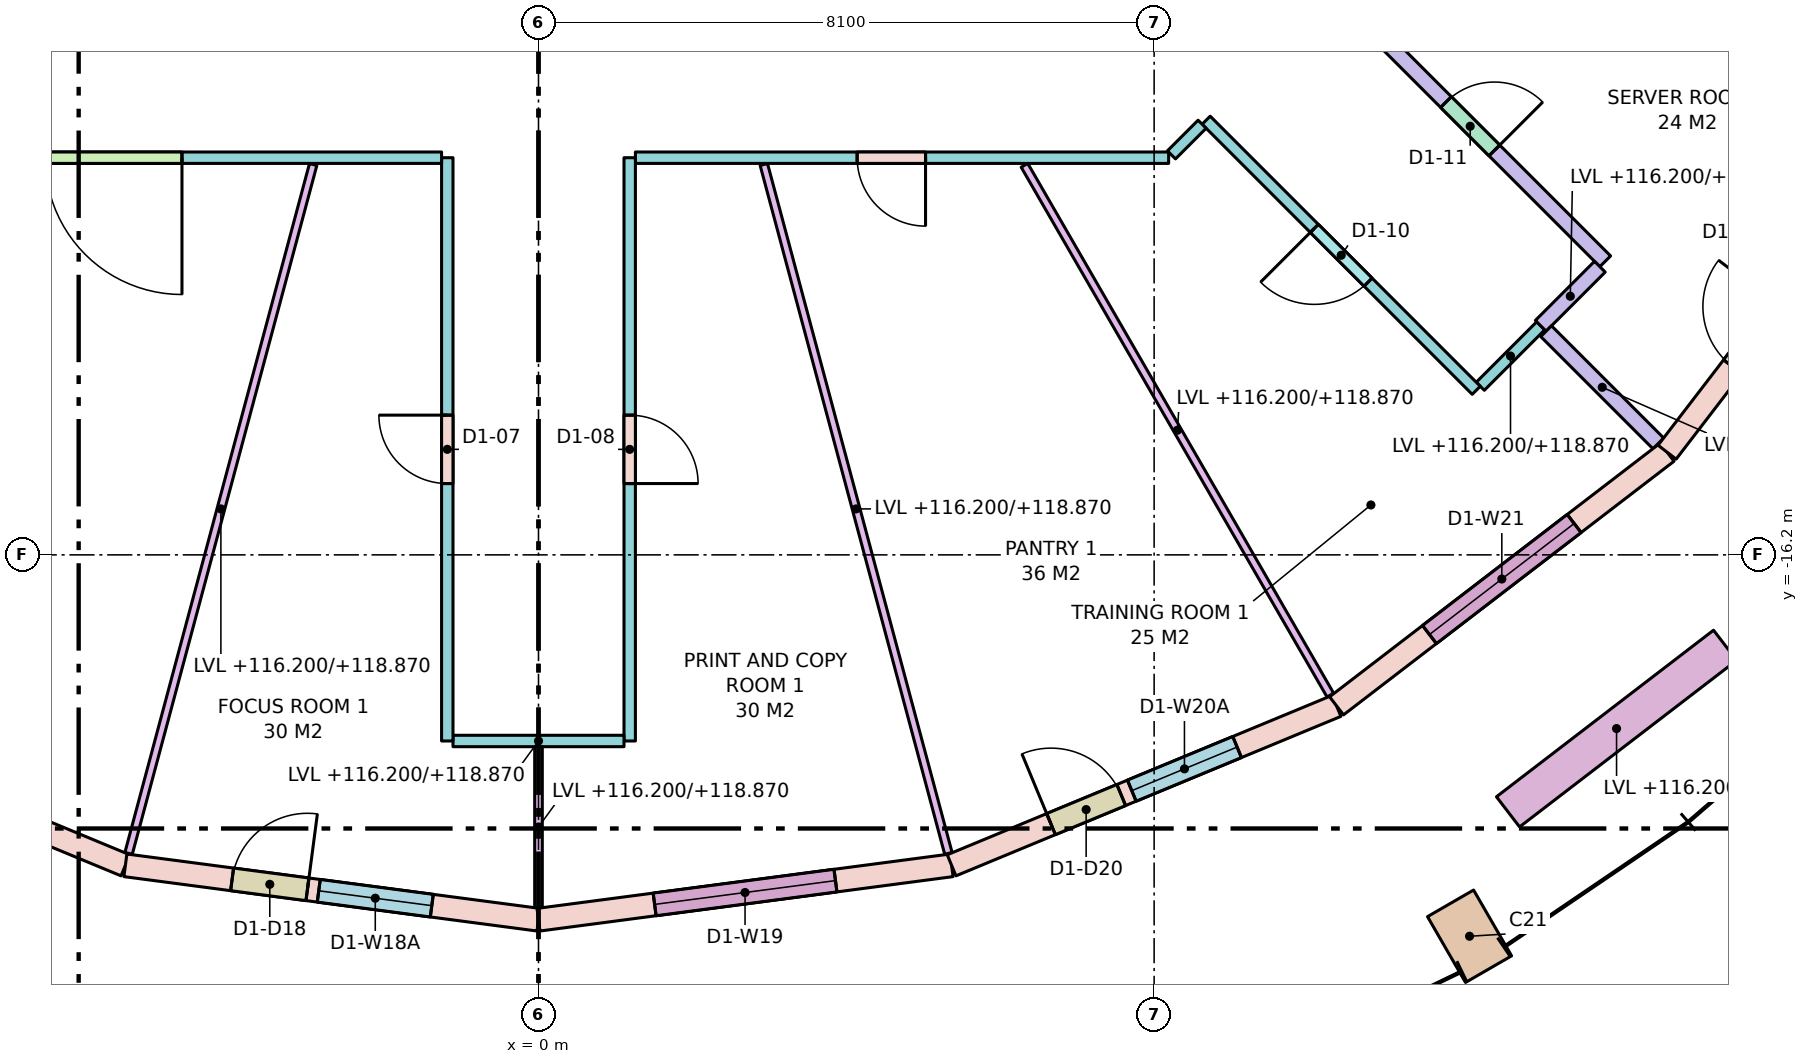
"""IFC4 building model, lengths in metres.
Left out: names, types, materials, properties, quantities, classifications, styles, units other than length and angle.
Written with IfcOpenShell. Run it as: python <this file> out.ifc"""

import sys

from ifc_helpers import new_model, si_unit, direction, frame, frame_2d, origin, origin_2d, place, context, subcontext, project, spatial, rectangle, extrude, element, fill, save


model = new_model("IFC4")
c1 = context("Model", 3, precision=1e-05, world=origin(), true_north=direction((0.0, 1.0)))
c2 = subcontext(c1, "Body", "Model", "MODEL_VIEW")
j1 = project(units=[si_unit("LENGTHUNIT", "METRE"), si_unit("PLANEANGLEUNIT", "RADIAN")], contexts=[c1])
p1 = place(None, origin())
s1 = spatial("IfcSite", under=j1, at=p1, CompositionType="ELEMENT")
p2 = place(p1, origin())
s2 = spatial("IfcBuilding", under=s1, at=p2, CompositionType="ELEMENT")
p3 = place(p2, frame((0.0, 0.0, 116.2)))
s3 = spatial("IfcBuildingStorey", under=s2, at=p3, CompositionType="ELEMENT", Elevation=116.2)
p4 = place(p3, frame((12.25, -21.218, 0.0), z_axis=(0.0, 0.0, 1.0), x_axis=(0.866025403784, 0.5, 0.0)))
e1 = element("IfcColumn", 1, at=p4, inside=s3, PredefinedType="COLUMN", context=c2, shape_type="SweptSolid", body=[
    extrude(rectangle(XDim=0.7, YDim=1.0, at=origin_2d()), origin(), (0.0, 0.0, 1.0), 3.8),
])
p5 = place(p3, frame((-10.5, -18.187, 0.0), z_axis=(0.0, 0.0, 1.0), x_axis=(0.923877333662, -0.382688740813, 0.0)))
e2 = element("IfcWall", 2, at=p5, inside=s3, PredefinedType="STANDARD", context=c2, shape_type="SweptSolid", body=[
    extrude(rectangle(XDim=5.482, YDim=0.3, at=frame_2d((2.741, 0.0))), origin(), (0.0, 0.0, 1.0), 3.52),
])
p6 = place(p5, frame((1.541, 0.0, 0.8)))
e3 = element("IfcOpeningElement", 3, at=p6, cuts=e2, PredefinedType="OPENING", context=c2, shape_type="SweptSolid", body=[
    extrude(rectangle(XDim=2.4, YDim=2.5, at=frame_2d((1.2, 1.25))), frame((0.0, 0.16, 0.0), z_axis=(0.0, -1.0, 0.0), x_axis=(1.0, 0.0, 0.0)), (0.0, 0.0, 1.0), 0.32),
])
p7 = place(p3, frame((-5.435, -20.284, 0.0), z_axis=(0.0, 0.0, 1.0), x_axis=(0.991444743541, -0.130527087244, 0.0)))
e4 = element("IfcWall", 4, at=p7, inside=s3, PredefinedType="STANDARD", context=c2, shape_type="SweptSolid", body=[
    extrude(rectangle(XDim=5.482, YDim=0.3, at=frame_2d((2.741, 0.0))), origin(), (0.0, 0.0, 1.0), 3.52),
])
p8 = place(p7, frame((1.416, 0.0, 0.0)))
e5 = element("IfcOpeningElement", 5, at=p8, cuts=e4, PredefinedType="OPENING", context=c2, shape_type="SweptSolid", body=[
    extrude(rectangle(XDim=1.0, YDim=2.4, at=frame_2d((0.5, 1.2))), frame((0.0, 0.16, 0.0), z_axis=(0.0, -1.0, 0.0), x_axis=(1.0, 0.0, 0.0)), (0.0, 0.0, 1.0), 0.32),
])
p9 = place(p7, frame((2.566, 0.0, 0.8)))
e6 = element("IfcOpeningElement", 6, at=p9, cuts=e4, PredefinedType="OPENING", context=c2, shape_type="SweptSolid", body=[
    extrude(rectangle(XDim=1.5, YDim=2.5, at=frame_2d((0.75, 1.25))), frame((0.0, 0.16, 0.0), z_axis=(0.0, -1.0, 0.0), x_axis=(1.0, 0.0, 0.0)), (0.0, 0.0, 1.0), 0.32),
])
p10 = place(p3, frame((0.0, -21.0, 0.0), z_axis=(0.0, 0.0, 1.0), x_axis=(0.991444743541, 0.130527087244, 0.0)))
e7 = element("IfcWall", 7, at=p10, inside=s3, PredefinedType="STANDARD", context=c2, shape_type="SweptSolid", body=[
    extrude(rectangle(XDim=5.482, YDim=0.3, at=frame_2d((2.741, 0.0))), origin(), (0.0, 0.0, 1.0), 3.52),
])
p11 = place(p10, frame((1.541, 0.0, 0.8)))
e8 = element("IfcOpeningElement", 8, at=p11, cuts=e7, PredefinedType="OPENING", context=c2, shape_type="SweptSolid", body=[
    extrude(rectangle(XDim=2.4, YDim=2.5, at=frame_2d((1.2, 1.25))), frame((0.0, 0.16, 0.0), z_axis=(0.0, -1.0, 0.0), x_axis=(1.0, 0.0, 0.0)), (0.0, 0.0, 1.0), 0.32),
])
p12 = place(p3, frame((5.435, -20.284, 0.0), z_axis=(0.0, 0.0, 1.0), x_axis=(0.923877333662, 0.382688740813, 0.0)))
e9 = element("IfcWall", 9, at=p12, inside=s3, PredefinedType="STANDARD", context=c2, shape_type="SweptSolid", body=[
    extrude(rectangle(XDim=5.482, YDim=0.3, at=frame_2d((2.741, 0.0))), origin(), (0.0, 0.0, 1.0), 3.52),
])
p13 = place(p12, frame((1.416, 0.0, 0.0)))
e10 = element("IfcOpeningElement", 10, at=p13, cuts=e9, PredefinedType="OPENING", context=c2, shape_type="SweptSolid", body=[
    extrude(rectangle(XDim=1.0, YDim=2.4, at=frame_2d((0.5, 1.2))), frame((0.0, 0.16, 0.0), z_axis=(0.0, -1.0, 0.0), x_axis=(1.0, 0.0, 0.0)), (0.0, 0.0, 1.0), 0.32),
])
p14 = place(p12, frame((2.566, 0.0, 0.8)))
e11 = element("IfcOpeningElement", 11, at=p14, cuts=e9, PredefinedType="OPENING", context=c2, shape_type="SweptSolid", body=[
    extrude(rectangle(XDim=1.5, YDim=2.5, at=frame_2d((0.75, 1.25))), frame((0.0, 0.16, 0.0), z_axis=(0.0, -1.0, 0.0), x_axis=(1.0, 0.0, 0.0)), (0.0, 0.0, 1.0), 0.32),
])
p15 = place(p3, frame((10.5, -18.187, 0.0), z_axis=(0.0, 0.0, 1.0), x_axis=(0.793335336593, 0.608784891166, 0.0)))
e12 = element("IfcWall", 12, at=p15, inside=s3, PredefinedType="STANDARD", context=c2, shape_type="SweptSolid", body=[
    extrude(rectangle(XDim=5.482, YDim=0.3, at=frame_2d((2.741, 0.0))), origin(), (0.0, 0.0, 1.0), 3.52),
])
p16 = place(p15, frame((1.541, 0.0, 0.8)))
e13 = element("IfcOpeningElement", 13, at=p16, cuts=e12, PredefinedType="OPENING", context=c2, shape_type="SweptSolid", body=[
    extrude(rectangle(XDim=2.4, YDim=2.5, at=frame_2d((1.2, 1.25))), frame((0.0, 0.16, 0.0), z_axis=(0.0, -1.0, 0.0), x_axis=(1.0, 0.0, 0.0)), (0.0, 0.0, 1.0), 0.32),
])
p17 = place(p3, frame((14.849, -14.849, 0.0), z_axis=(0.0, 0.0, 1.0), x_axis=(0.608784891166, 0.793335336593, 0.0)))
e14 = element("IfcWall", 14, at=p17, inside=s3, PredefinedType="STANDARD", context=c2, shape_type="SweptSolid", body=[
    extrude(rectangle(XDim=5.482, YDim=0.3, at=frame_2d((2.741, 0.0))), origin(), (0.0, 0.0, 1.0), 3.52),
])
p18 = place(p17, frame((1.416, 0.0, 0.0)))
e15 = element("IfcOpeningElement", 15, at=p18, cuts=e14, PredefinedType="OPENING", context=c2, shape_type="SweptSolid", body=[
    extrude(rectangle(XDim=1.0, YDim=2.4, at=frame_2d((0.5, 1.2))), frame((0.0, 0.16, 0.0), z_axis=(0.0, -1.0, 0.0), x_axis=(1.0, 0.0, 0.0)), (0.0, 0.0, 1.0), 0.32),
])
p19 = place(p17, frame((2.566, 0.0, 0.8)))
e16 = element("IfcOpeningElement", 16, at=p19, cuts=e14, PredefinedType="OPENING", context=c2, shape_type="SweptSolid", body=[
    extrude(rectangle(XDim=1.5, YDim=2.5, at=frame_2d((0.75, 1.25))), frame((0.0, 0.16, 0.0), z_axis=(0.0, -1.0, 0.0), x_axis=(1.0, 0.0, 0.0)), (0.0, 0.0, 1.0), 0.32),
])
p20 = place(p3, frame((12.756, -19.581, 0.0), z_axis=(0.0, 0.0, 1.0), x_axis=(0.793384730612, 0.608720518162, 0.0)))
e17 = element("IfcWall", 17, at=p20, inside=s3, PredefinedType="PARAPET", context=c2, shape_type="SweptSolid", body=[
    extrude(rectangle(XDim=3.6, YDim=0.5, at=frame_2d((1.8, 0.0))), origin(), (0.0, 0.0, 1.0), 0.9),
])
p21 = place(p3, frame((10.481, -8.784, 0.0), z_axis=(0.0, 0.0, 1.0), x_axis=(0.707106781187, -0.707106781187, 0.0)))
e18 = element("IfcWall", 18, at=p21, inside=s3, PredefinedType="PARTITIONING", context=c2, shape_type="SweptSolid", body=[
    extrude(rectangle(XDim=5.026, YDim=0.2, at=frame_2d((2.513, 0.0))), origin(), (0.0, 0.0, 1.0), 3.52),
])
p22 = place(p21, frame((2.063, 0.0, 0.0)))
e19 = element("IfcOpeningElement", 19, at=p22, cuts=e18, PredefinedType="OPENING", context=c2, shape_type="SweptSolid", body=[
    extrude(rectangle(XDim=0.9, YDim=2.1, at=frame_2d((0.45, 1.05))), frame((0.0, 0.11, 0.0), z_axis=(0.0, -1.0, 0.0), x_axis=(1.0, 0.0, 0.0)), (0.0, 0.0, 1.0), 0.22),
])
p23 = place(p3, frame((13.964, -12.409, 0.0), z_axis=(0.0, 0.0, 1.0), x_axis=(-0.707106781187, -0.707106781187, 0.0)))
e20 = element("IfcWall", 20, at=p23, inside=s3, PredefinedType="PARTITIONING", context=c2, shape_type="SweptSolid", body=[
    extrude(rectangle(XDim=1.1, YDim=0.2, at=frame_2d((0.55, 0.0))), origin(), (0.0, 0.0, 1.0), 2.67),
])
p24 = place(p3, frame((13.187, -13.187, 0.0), z_axis=(0.0, 0.0, 1.0), x_axis=(-0.706998270979, -0.707215274745, 0.0)))
e21 = element("IfcWall", 21, at=p24, inside=s3, PredefinedType="PARTITIONING", context=c2, shape_type="SweptSolid", body=[
    extrude(rectangle(XDim=1.125, YDim=0.15, at=frame_2d((0.562, 0.0))), origin(), (0.0, 0.0, 1.0), 2.67),
])
p25 = place(p3, frame((12.338, -14.035, 0.0), z_axis=(0.0, 0.0, 1.0), x_axis=(-0.707106781187, 0.707106781187, 0.0)))
e22 = element("IfcWall", 22, at=p25, inside=s3, PredefinedType="PARTITIONING", context=c2, shape_type="SweptSolid", body=[
    extrude(rectangle(XDim=5.026, YDim=0.15, at=frame_2d((2.513, 0.0))), origin(), (0.0, 0.0, 1.0), 3.52),
])
p26 = place(p25, frame((2.013, 0.0, 0.0)))
e23 = element("IfcOpeningElement", 23, at=p26, cuts=e22, PredefinedType="OPENING", context=c2, shape_type="SweptSolid", body=[
    extrude(rectangle(XDim=1.0, YDim=2.1, at=frame_2d((0.5, 1.05))), frame((0.0, 0.085, 0.0), z_axis=(0.0, -1.0, 0.0), x_axis=(1.0, 0.0, 0.0)), (0.0, 0.0, 1.0), 0.17),
])
p27 = place(p3, frame((8.731, -10.534, 0.0), z_axis=(0.0, 0.0, 1.0), x_axis=(-0.707106781187, -0.707106781187, 0.0)))
e24 = element("IfcWall", 24, at=p27, inside=s3, PredefinedType="PARTITIONING", context=c2, shape_type="SweptSolid", body=[
    extrude(rectangle(XDim=0.571, YDim=0.15, at=frame_2d((0.285, 0.0))), origin(), (0.0, 0.0, 1.0), 3.52),
])
p28 = place(p3, frame((8.291, -10.975, 0.0), z_axis=(0.0, 0.0, 1.0), x_axis=(-1.0, 0.0, 0.0)))
e25 = element("IfcWall", 25, at=p28, inside=s3, PredefinedType="PARTITIONING", context=c2, shape_type="SweptSolid", body=[
    extrude(rectangle(XDim=7.016, YDim=0.15, at=frame_2d((3.508, 0.0))), origin(), (0.0, 0.0, 1.0), 2.67),
])
p29 = place(p28, frame((3.198, 0.0, 0.0)))
e26 = element("IfcOpeningElement", 26, at=p29, cuts=e25, PredefinedType="OPENING", context=c2, shape_type="SweptSolid", body=[
    extrude(rectangle(XDim=0.9, YDim=2.1, at=frame_2d((0.45, 1.05))), frame((0.0, 0.085, 0.0), z_axis=(0.0, -1.0, 0.0), x_axis=(1.0, 0.0, 0.0)), (0.0, 0.0, 1.0), 0.17),
])
p30 = place(p3, frame((1.2, -10.975, 0.0), z_axis=(0.0, 0.0, 1.0), x_axis=(0.0, -1.0, 0.0)))
e27 = element("IfcWall", 27, at=p30, inside=s3, PredefinedType="PARTITIONING", context=c2, shape_type="SweptSolid", body=[
    extrude(rectangle(XDim=7.674, YDim=0.15, at=frame_2d((3.837, 0.0))), origin(), (0.0, 0.0, 1.0), 3.52),
])
p31 = place(p30, frame((3.387, 0.0, 0.0)))
e28 = element("IfcOpeningElement", 28, at=p31, cuts=e27, PredefinedType="OPENING", context=c2, shape_type="SweptSolid", body=[
    extrude(rectangle(XDim=0.9, YDim=2.1, at=frame_2d((0.45, 1.05))), frame((0.0, 0.085, 0.0), z_axis=(0.0, -1.0, 0.0), x_axis=(1.0, 0.0, 0.0)), (0.0, 0.0, 1.0), 0.17),
])
p32 = place(p3, frame((1.125, -18.649, 0.0), z_axis=(0.0, 0.0, 1.0), x_axis=(-1.0, 0.0, 0.0)))
e29 = element("IfcWall", 29, at=p32, inside=s3, PredefinedType="PARTITIONING", context=c2, shape_type="SweptSolid", body=[
    extrude(rectangle(XDim=2.25, YDim=0.15, at=frame_2d((1.125, 0.0))), origin(), (0.0, 0.0, 1.0), 2.67),
])
p33 = place(p3, frame((-1.2, -18.649, 0.0), z_axis=(0.0, 0.0, 1.0), x_axis=(0.0, 1.0, 0.0)))
e30 = element("IfcWall", 30, at=p33, inside=s3, PredefinedType="PARTITIONING", context=c2, shape_type="SweptSolid", body=[
    extrude(rectangle(XDim=7.674, YDim=0.15, at=frame_2d((3.837, 0.0))), origin(), (0.0, 0.0, 1.0), 3.52),
])
p34 = place(p33, frame((3.387, 0.0, 0.0)))
e31 = element("IfcOpeningElement", 31, at=p34, cuts=e30, PredefinedType="OPENING", context=c2, shape_type="SweptSolid", body=[
    extrude(rectangle(XDim=0.9, YDim=2.1, at=frame_2d((0.45, 1.05))), frame((0.0, 0.085, 0.0), z_axis=(0.0, -1.0, 0.0), x_axis=(1.0, 0.0, 0.0)), (0.0, 0.0, 1.0), 0.17),
])
p35 = place(p3, frame((-1.275, -10.975, 0.0), z_axis=(0.0, 0.0, 1.0), x_axis=(-1.0, 0.0, 0.0)))
e32 = element("IfcWall", 32, at=p35, inside=s3, PredefinedType="PARTITIONING", context=c2, shape_type="SweptSolid", body=[
    extrude(rectangle(XDim=7.016, YDim=0.15, at=frame_2d((3.508, 0.0))), origin(), (0.0, 0.0, 1.0), 2.67),
])
p36 = place(p35, frame((3.416, 0.0, 0.0)))
e33 = element("IfcOpeningElement", 33, at=p36, cuts=e32, PredefinedType="OPENING", context=c2, shape_type="SweptSolid", body=[
    extrude(rectangle(XDim=1.8, YDim=2.1, at=frame_2d((0.9, 1.05))), frame((0.0, 0.085, 0.0), z_axis=(0.0, -1.0, 0.0), x_axis=(1.0, 0.0, 0.0)), (0.0, 0.0, 1.0), 0.17),
])
p37 = place(p3, frame((-2.965, -11.064, 0.0), z_axis=(0.0, 0.0, 1.0), x_axis=(-0.258812392192, -0.965927608906, 0.0)))
e34 = element("IfcWall", 34, at=p37, inside=s3, PredefinedType="PARTITIONING", context=c2, shape_type="SweptSolid", body=[
    extrude(rectangle(XDim=9.382, YDim=0.1, at=frame_2d((4.691, 0.0))), origin(), (0.0, 0.0, 1.0), 2.67),
])
p38 = place(p3, frame((0.0, -18.724, 0.0), z_axis=(0.0, 0.0, 1.0), x_axis=(0.0, -1.0, 0.0)))
e35 = element("IfcWall", 35, at=p38, inside=s3, PredefinedType="PARTITIONING", context=c2, shape_type="SweptSolid", body=[
    extrude(rectangle(XDim=2.113, YDim=0.1, at=frame_2d((1.057, 0.0))), origin(), (0.0, 0.0, 1.0), 2.67),
])
p39 = place(p3, frame((2.965, -11.064, 0.0), z_axis=(0.0, 0.0, 1.0), x_axis=(0.258812392192, -0.965927608906, 0.0)))
e36 = element("IfcWall", 36, at=p39, inside=s3, PredefinedType="PARTITIONING", context=c2, shape_type="SweptSolid", body=[
    extrude(rectangle(XDim=9.382, YDim=0.1, at=frame_2d((4.691, 0.0))), origin(), (0.0, 0.0, 1.0), 2.67),
])
p40 = place(p3, frame((6.394, -11.075, 0.0), z_axis=(0.0, 0.0, 1.0), x_axis=(0.500024397361, -0.866011317503, 0.0)))
e37 = element("IfcWall", 37, at=p40, inside=s3, PredefinedType="PARTITIONING", context=c2, shape_type="SweptSolid", body=[
    extrude(rectangle(XDim=8.049, YDim=0.1, at=frame_2d((4.024, 0.0))), origin(), (0.0, 0.0, 1.0), 2.67),
])
p41 = place(p3, frame((13.257, -13.257, 0.0), z_axis=(0.0, 0.0, 1.0), x_axis=(0.707106781187, -0.707106781187, 0.0)))
e38 = element("IfcWall", 38, at=p41, inside=s3, PredefinedType="PARTITIONING", context=c2, shape_type="SweptSolid", body=[
    extrude(rectangle(XDim=2.088, YDim=0.2, at=frame_2d((1.044, 0.0))), origin(), (0.0, 0.0, 1.0), 2.67),
])
p42 = place(p3, frame((12.305, -7.104, 0.0), z_axis=(0.0, 0.0, 1.0), x_axis=(0.866019973495, -0.500009405419, 0.0)))
e39 = element("IfcWall", 39, at=p42, inside=s3, PredefinedType="PARTITIONING", context=c2, shape_type="SweptSolid", body=[
    extrude(rectangle(XDim=6.628, YDim=0.2, at=frame_2d((3.314, 0.0))), origin(), (0.0, 0.0, 1.0), 2.67),
])
p43 = place(p8, origin())
e40 = element("IfcDoor", 40, at=p43, inside=s3, OperationType="SINGLE_SWING_RIGHT", PredefinedType="DOOR", context=c2, shape_type="SweptSolid", body=[
    extrude(rectangle(XDim=1.0, YDim=2.4, at=frame_2d((0.5, 1.2))), frame((0.0, 0.025, 0.0), z_axis=(0.0, -1.0, 0.0), x_axis=(1.0, 0.0, 0.0)), (0.0, 0.0, 1.0), 0.05),
])
fill(e5, e40)
p44 = place(p9, origin())
e41 = element("IfcWindow", 41, at=p44, inside=s3, PartitioningType="SINGLE_PANEL", PredefinedType="WINDOW", context=c2, shape_type="SweptSolid", body=[
    extrude(rectangle(XDim=1.5, YDim=2.5, at=frame_2d((0.75, 1.25))), frame((0.0, 0.03, 0.0), z_axis=(0.0, -1.0, 0.0), x_axis=(1.0, 0.0, 0.0)), (0.0, 0.0, 1.0), 0.06),
])
fill(e6, e41)
p45 = place(p11, origin())
e42 = element("IfcWindow", 42, at=p45, inside=s3, PartitioningType="SINGLE_PANEL", PredefinedType="WINDOW", context=c2, shape_type="SweptSolid", body=[
    extrude(rectangle(XDim=2.4, YDim=2.5, at=frame_2d((1.2, 1.25))), frame((0.0, 0.03, 0.0), z_axis=(0.0, -1.0, 0.0), x_axis=(1.0, 0.0, 0.0)), (0.0, 0.0, 1.0), 0.06),
])
fill(e8, e42)
p46 = place(p13, origin())
e43 = element("IfcDoor", 43, at=p46, inside=s3, OperationType="SINGLE_SWING_LEFT", PredefinedType="DOOR", context=c2, shape_type="SweptSolid", body=[
    extrude(rectangle(XDim=1.0, YDim=2.4, at=frame_2d((0.5, 1.2))), frame((0.0, 0.025, 0.0), z_axis=(0.0, -1.0, 0.0), x_axis=(1.0, 0.0, 0.0)), (0.0, 0.0, 1.0), 0.05),
])
fill(e10, e43)
p47 = place(p14, origin())
e44 = element("IfcWindow", 44, at=p47, inside=s3, PartitioningType="SINGLE_PANEL", PredefinedType="WINDOW", context=c2, shape_type="SweptSolid", body=[
    extrude(rectangle(XDim=1.5, YDim=2.5, at=frame_2d((0.75, 1.25))), frame((0.0, 0.03, 0.0), z_axis=(0.0, -1.0, 0.0), x_axis=(1.0, 0.0, 0.0)), (0.0, 0.0, 1.0), 0.06),
])
fill(e11, e44)
p48 = place(p16, origin())
e45 = element("IfcWindow", 45, at=p48, inside=s3, PartitioningType="SINGLE_PANEL", PredefinedType="WINDOW", context=c2, shape_type="SweptSolid", body=[
    extrude(rectangle(XDim=2.4, YDim=2.5, at=frame_2d((1.2, 1.25))), frame((0.0, 0.03, 0.0), z_axis=(0.0, -1.0, 0.0), x_axis=(1.0, 0.0, 0.0)), (0.0, 0.0, 1.0), 0.06),
])
fill(e13, e45)
p49 = place(p36, origin())
e46 = element("IfcDoor", 46, at=p49, inside=s3, OperationType="DOUBLE_DOOR_SINGLE_SWING", PredefinedType="DOOR", context=c2, shape_type="SweptSolid", body=[
    extrude(rectangle(XDim=1.8, YDim=2.1, at=frame_2d((0.9, 1.05))), frame((0.0, 0.025, 0.0), z_axis=(0.0, -1.0, 0.0), x_axis=(1.0, 0.0, 0.0)), (0.0, 0.0, 1.0), 0.05),
])
fill(e33, e46)
p50 = place(p34, origin())
e47 = element("IfcDoor", 47, at=p50, inside=s3, OperationType="SINGLE_SWING_RIGHT", PredefinedType="DOOR", context=c2, shape_type="SweptSolid", body=[
    extrude(rectangle(XDim=0.9, YDim=2.1, at=frame_2d((0.45, 1.05))), frame((0.0, 0.025, 0.0), z_axis=(0.0, -1.0, 0.0), x_axis=(1.0, 0.0, 0.0)), (0.0, 0.0, 1.0), 0.05),
])
fill(e31, e47)
p51 = place(p31, origin())
e48 = element("IfcDoor", 48, at=p51, inside=s3, OperationType="SINGLE_SWING_RIGHT", PredefinedType="DOOR", context=c2, shape_type="SweptSolid", body=[
    extrude(rectangle(XDim=0.9, YDim=2.1, at=frame_2d((0.45, 1.05))), frame((0.0, 0.025, 0.0), z_axis=(0.0, -1.0, 0.0), x_axis=(1.0, 0.0, 0.0)), (0.0, 0.0, 1.0), 0.05),
])
fill(e28, e48)
p52 = place(p29, origin())
e49 = element("IfcDoor", 49, at=p52, inside=s3, OperationType="SINGLE_SWING_LEFT", PredefinedType="DOOR", context=c2, shape_type="SweptSolid", body=[
    extrude(rectangle(XDim=0.9, YDim=2.1, at=frame_2d((0.45, 1.05))), frame((0.0, 0.025, 0.0), z_axis=(0.0, -1.0, 0.0), x_axis=(1.0, 0.0, 0.0)), (0.0, 0.0, 1.0), 0.05),
])
fill(e26, e49)
p53 = place(p26, origin())
e50 = element("IfcDoor", 50, at=p53, inside=s3, OperationType="SINGLE_SWING_RIGHT", PredefinedType="DOOR", context=c2, shape_type="SweptSolid", body=[
    extrude(rectangle(XDim=1.0, YDim=2.1, at=frame_2d((0.5, 1.05))), frame((0.0, 0.025, 0.0), z_axis=(0.0, -1.0, 0.0), x_axis=(1.0, 0.0, 0.0)), (0.0, 0.0, 1.0), 0.05),
])
fill(e23, e50)
p54 = place(p22, origin())
e51 = element("IfcDoor", 51, at=p54, inside=s3, OperationType="SINGLE_SWING_RIGHT", PredefinedType="DOOR", context=c2, shape_type="SweptSolid", body=[
    extrude(rectangle(XDim=0.9, YDim=2.1, at=frame_2d((0.45, 1.05))), frame((0.0, 0.025, 0.0), z_axis=(0.0, -1.0, 0.0), x_axis=(1.0, 0.0, 0.0)), (0.0, 0.0, 1.0), 0.05),
])
fill(e19, e51)
save(model, sys.argv[1])
